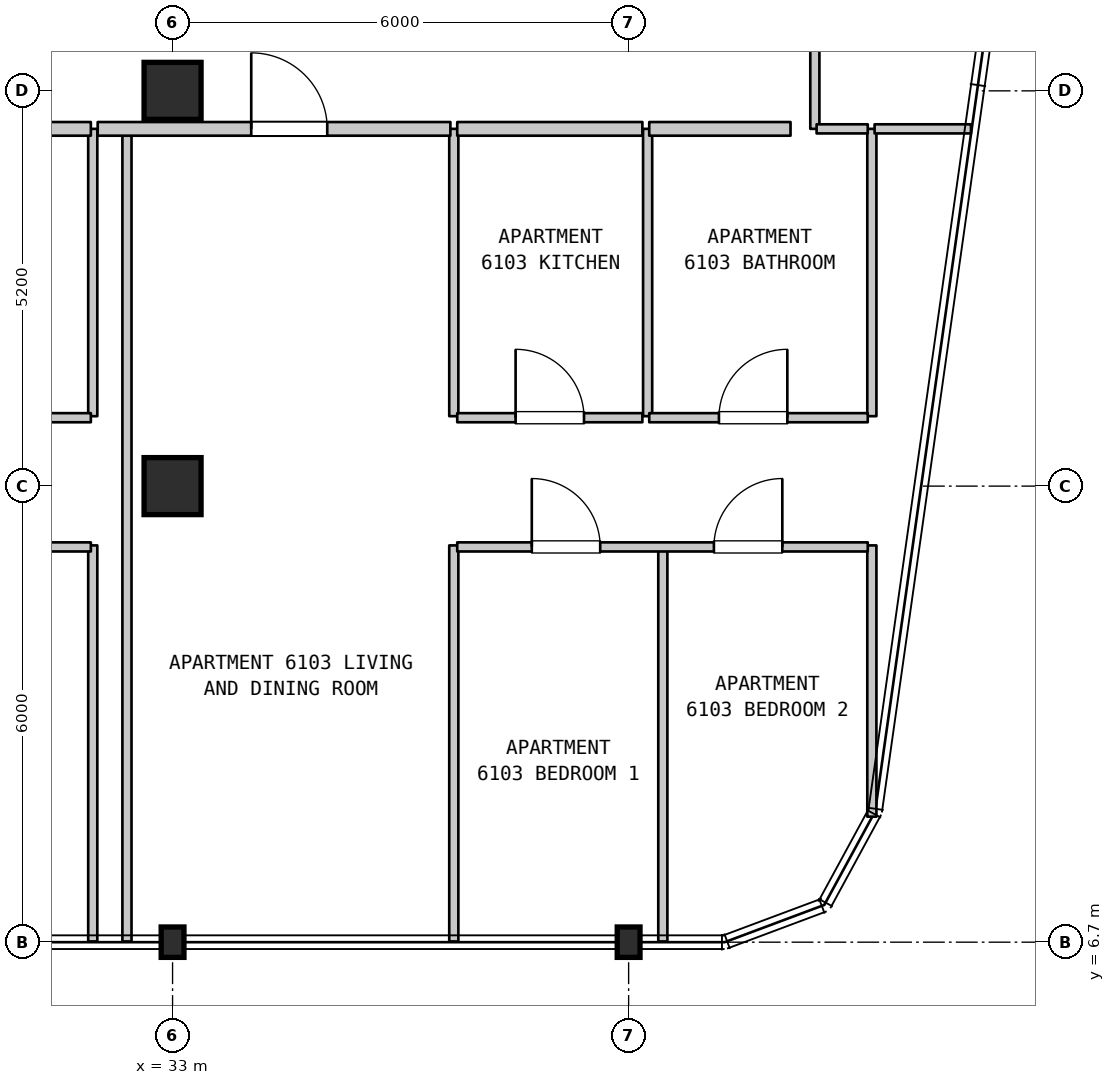
"""IFC4 building model, lengths in metres.
Left out: names, types, materials, properties, quantities, classifications, styles, units other than length and angle.
Written with IfcOpenShell. Run it as: python <this file> out.ifc"""

import sys

from ifc_helpers import new_model, si_unit, direction, frame, frame_2d, origin, origin_2d, place, context, subcontext, project, spatial, rectangle, i_section, extrude, element, fill, save


model = new_model("IFC4")
c1 = context("Model", 3, precision=1e-05, world=origin(), true_north=direction((0.0, 1.0)))
c2 = subcontext(c1, "Body", "Model", "MODEL_VIEW")
j1 = project(units=[si_unit("LENGTHUNIT", "METRE"), si_unit("PLANEANGLEUNIT", "RADIAN")], contexts=[c1])
p1 = place(None, origin())
s1 = spatial("IfcSite", under=j1, at=p1, CompositionType="ELEMENT")
p2 = place(p1, origin())
s2 = spatial("IfcBuilding", under=s1, at=p2, CompositionType="ELEMENT")
p3 = place(p2, frame((0.0, 0.0, 247.3)))
s3 = spatial("IfcBuildingStorey", under=s2, at=p3, CompositionType="ELEMENT", Elevation=247.3)
p4 = place(p3, frame((33.0, 6.7, 0.0), z_axis=(0.0, 0.0, 1.0), x_axis=(1.0, 0.0, 0.0)))
e1 = element("IfcColumn", 1, at=p4, inside=s3, PredefinedType="COLUMN", context=c2, shape_type="SweptSolid", body=[
    extrude(i_section(OverallWidth=0.3, OverallDepth=0.4, WebThickness=0.013, FlangeThickness=0.024, FilletRadius=0.027, at=origin_2d()), origin(), (0.0, 0.0, 1.0), 3.7),
])
for number, where, z_axis, x_axis in (
    (2, (33.0, 12.7, 0.0), (0.0, 0.0, 1.0), (1.0, 0.0, 0.0)),
    (3, (33.0, 17.9, 0.0), (0.0, 0.0, 1.0), (1.0, 0.0, 0.0)),
):
    element("IfcColumn", number, at=place(p3, frame(where, z_axis=z_axis, x_axis=x_axis)), inside=s3, PredefinedType="COLUMN", context=c2, shape_type="SweptSolid", body=[
        extrude(rectangle(XDim=0.75, YDim=0.75, at=origin_2d()), origin(), (0.0, 0.0, 1.0), 3.7),
    ])
p5 = place(p3, frame((39.0, 6.7, 0.0), z_axis=(0.0, 0.0, 1.0), x_axis=(1.0, 0.0, 0.0)))
e4 = element("IfcColumn", 4, at=p5, inside=s3, PredefinedType="COLUMN", context=c2, shape_type="SweptSolid", body=[
    extrude(i_section(OverallWidth=0.3, OverallDepth=0.4, WebThickness=0.013, FlangeThickness=0.024, FilletRadius=0.027, at=origin_2d()), origin(), (0.0, 0.0, 1.0), 3.7),
])
p6 = place(p3, frame((31.95, 6.71, 0.0), z_axis=(0.0, 0.0, 1.0), x_axis=(0.0, 1.0, 0.0)))
e5 = element("IfcWall", 5, at=p6, inside=s3, PredefinedType="PARTITIONING", context=c2, shape_type="SweptSolid", body=[
    extrude(rectangle(XDim=5.21, YDim=0.12, at=frame_2d((2.605, 0.0))), origin(), (0.0, 0.0, 1.0), 3.39),
])
p7 = place(p3, frame((31.95, 13.62, 0.0), z_axis=(0.0, 0.0, 1.0), x_axis=(0.0, 1.0, 0.0)))
e6 = element("IfcWall", 6, at=p7, inside=s3, PredefinedType="PARTITIONING", context=c2, shape_type="SweptSolid", body=[
    extrude(rectangle(XDim=3.78, YDim=0.12, at=frame_2d((1.89, 0.0))), origin(), (0.0, 0.0, 1.0), 3.39),
])
p8 = place(p3, frame((32.4, 6.71, 0.0), z_axis=(0.0, 0.0, 1.0), x_axis=(0.0, 1.0, 0.0)))
e7 = element("IfcWall", 7, at=p8, inside=s3, PredefinedType="PARTITIONING", context=c2, shape_type="SweptSolid", body=[
    extrude(rectangle(XDim=10.69, YDim=0.12, at=frame_2d((5.345, 0.0))), origin(), (0.0, 0.0, 1.0), 3.39),
])
p9 = place(p3, frame((36.7, 6.71, 0.0), z_axis=(0.0, 0.0, 1.0), x_axis=(0.0, 1.0, 0.0)))
e8 = element("IfcWall", 8, at=p9, inside=s3, PredefinedType="PARTITIONING", context=c2, shape_type="SweptSolid", body=[
    extrude(rectangle(XDim=5.21, YDim=0.12, at=frame_2d((2.605, 0.0))), origin(), (0.0, 0.0, 1.0), 3.39),
])
for number, where, z_axis, x_axis in (
    (9, (36.7, 13.62, 0.0), (0.0, 0.0, 1.0), (0.0, 1.0, 0.0)),
    (10, (39.25, 13.62, 0.0), (0.0, 0.0, 1.0), (0.0, 1.0, 0.0)),
):
    element("IfcWall", number, at=place(p3, frame(where, z_axis=z_axis, x_axis=x_axis)), inside=s3, PredefinedType="PARTITIONING", context=c2, shape_type="SweptSolid", body=[
        extrude(rectangle(XDim=3.78, YDim=0.12, at=frame_2d((1.89, 0.0))), origin(), (0.0, 0.0, 1.0), 3.39),
    ])
p10 = place(p3, frame((39.45, 6.71, 0.0), z_axis=(0.0, 0.0, 1.0), x_axis=(0.0, 1.0, 0.0)))
e11 = element("IfcWall", 11, at=p10, inside=s3, PredefinedType="PARTITIONING", context=c2, shape_type="SweptSolid", body=[
    extrude(rectangle(XDim=5.21, YDim=0.12, at=frame_2d((2.605, 0.0))), origin(), (0.0, 0.0, 1.0), 3.39),
])
p11 = place(p3, frame((41.45, 17.4, 0.0), z_axis=(0.0, 0.0, 1.0), x_axis=(0.0, 1.0, 0.0)))
e12 = element("IfcWall", 12, at=p11, inside=s3, PredefinedType="PARTITIONING", context=c2, shape_type="SweptSolid", body=[
    extrude(rectangle(XDim=2.099, YDim=0.12, at=frame_2d((1.05, 0.0))), origin(), (0.0, 0.0, 1.0), 3.39),
])
p12 = place(p3, frame((42.2, 8.351, 0.0), z_axis=(0.0, 0.0, 1.0), x_axis=(0.0, 1.0, 0.0)))
e13 = element("IfcWall", 13, at=p12, inside=s3, PredefinedType="PARTITIONING", context=c2, shape_type="SweptSolid", body=[
    extrude(rectangle(XDim=3.569, YDim=0.12, at=frame_2d((1.784, 0.0))), origin(), (0.0, 0.0, 1.0), 3.39),
])
p13 = place(p3, frame((42.2, 13.62, 0.0), z_axis=(0.0, 0.0, 1.0), x_axis=(0.0, 1.0, 0.0)))
e14 = element("IfcWall", 14, at=p13, inside=s3, PredefinedType="PARTITIONING", context=c2, shape_type="SweptSolid", body=[
    extrude(rectangle(XDim=3.78, YDim=0.12, at=frame_2d((1.89, 0.0))), origin(), (0.0, 0.0, 1.0), 3.39),
])
p14 = place(p3, frame((25.365, 11.9, 0.0), z_axis=(0.0, 0.0, 1.0), x_axis=(1.0, 0.0, 0.0)))
e15 = element("IfcWall", 15, at=p14, inside=s3, PredefinedType="PARTITIONING", context=c2, shape_type="SweptSolid", body=[
    extrude(rectangle(XDim=6.56, YDim=0.12, at=frame_2d((3.28, 0.0))), origin(), (0.0, 0.0, 1.0), 3.39),
])
p15 = place(p14, frame((1.271, 0.0, 0.0)))
e16 = element("IfcOpeningElement", 16, at=p15, cuts=e15, PredefinedType="OPENING", context=c2, shape_type="SweptSolid", body=[
    extrude(rectangle(XDim=0.9, YDim=2.15, at=frame_2d((0.45, 1.075))), frame((0.0, 0.07, 0.0), z_axis=(0.0, -1.0, 0.0), x_axis=(1.0, 0.0, 0.0)), (0.0, 0.0, 1.0), 0.14),
])
p16 = place(p14, frame((4.246, 0.0, 0.0)))
e17 = element("IfcOpeningElement", 17, at=p16, cuts=e15, PredefinedType="OPENING", context=c2, shape_type="SweptSolid", body=[
    extrude(rectangle(XDim=0.9, YDim=2.15, at=frame_2d((0.45, 1.075))), frame((0.0, 0.07, 0.0), z_axis=(0.0, -1.0, 0.0), x_axis=(1.0, 0.0, 0.0)), (0.0, 0.0, 1.0), 0.14),
])
p17 = place(p3, frame((36.745, 11.9, 0.0), z_axis=(0.0, 0.0, 1.0), x_axis=(1.0, 0.0, 0.0)))
e18 = element("IfcWall", 18, at=p17, inside=s3, PredefinedType="PARTITIONING", context=c2, shape_type="SweptSolid", body=[
    extrude(rectangle(XDim=5.401, YDim=0.12, at=frame_2d((2.7, 0.0))), origin(), (0.0, 0.0, 1.0), 3.39),
])
p18 = place(p17, frame((0.981, 0.0, 0.0)))
e19 = element("IfcOpeningElement", 19, at=p18, cuts=e18, PredefinedType="OPENING", context=c2, shape_type="SweptSolid", body=[
    extrude(rectangle(XDim=0.9, YDim=2.15, at=frame_2d((0.45, 1.075))), frame((0.0, 0.07, 0.0), z_axis=(0.0, -1.0, 0.0), x_axis=(1.0, 0.0, 0.0)), (0.0, 0.0, 1.0), 0.14),
])
p19 = place(p17, frame((3.377, 0.0, 0.0)))
e20 = element("IfcOpeningElement", 20, at=p19, cuts=e18, PredefinedType="OPENING", context=c2, shape_type="SweptSolid", body=[
    extrude(rectangle(XDim=0.9, YDim=2.15, at=frame_2d((0.45, 1.075))), frame((0.0, 0.07, 0.0), z_axis=(0.0, -1.0, 0.0), x_axis=(1.0, 0.0, 0.0)), (0.0, 0.0, 1.0), 0.14),
])
p20 = place(p3, frame((28.424, 13.6, 0.0), z_axis=(0.0, 0.0, 1.0), x_axis=(1.0, 0.0, 0.0)))
e21 = element("IfcWall", 21, at=p20, inside=s3, PredefinedType="PARTITIONING", context=c2, shape_type="SweptSolid", body=[
    extrude(rectangle(XDim=3.501, YDim=0.12, at=frame_2d((1.75, 0.0))), origin(), (0.0, 0.0, 1.0), 3.39),
])
p21 = place(p20, frame((1.228, 0.0, 0.0)))
e22 = element("IfcOpeningElement", 22, at=p21, cuts=e21, PredefinedType="OPENING", context=c2, shape_type="SweptSolid", body=[
    extrude(rectangle(XDim=0.9, YDim=2.1, at=frame_2d((0.45, 1.05))), frame((0.0, 0.07, 0.0), z_axis=(0.0, -1.0, 0.0), x_axis=(1.0, 0.0, 0.0)), (0.0, 0.0, 1.0), 0.14),
])
p22 = place(p3, frame((36.745, 13.6, 0.0), z_axis=(0.0, 0.0, 1.0), x_axis=(1.0, 0.0, 0.0)))
e23 = element("IfcWall", 23, at=p22, inside=s3, PredefinedType="PARTITIONING", context=c2, shape_type="SweptSolid", body=[
    extrude(rectangle(XDim=2.436, YDim=0.12, at=frame_2d((1.218, 0.0))), origin(), (0.0, 0.0, 1.0), 3.39),
])
p23 = place(p22, frame((0.768, 0.0, 0.0)))
e24 = element("IfcOpeningElement", 24, at=p23, cuts=e23, PredefinedType="OPENING", context=c2, shape_type="SweptSolid", body=[
    extrude(rectangle(XDim=0.9, YDim=2.15, at=frame_2d((0.45, 1.075))), frame((0.0, 0.07, 0.0), z_axis=(0.0, -1.0, 0.0), x_axis=(1.0, 0.0, 0.0)), (0.0, 0.0, 1.0), 0.14),
])
p24 = place(p3, frame((39.271, 13.6, 0.0), z_axis=(0.0, 0.0, 1.0), x_axis=(1.0, 0.0, 0.0)))
e25 = element("IfcWall", 25, at=p24, inside=s3, PredefinedType="PARTITIONING", context=c2, shape_type="SweptSolid", body=[
    extrude(rectangle(XDim=2.875, YDim=0.12, at=frame_2d((1.438, 0.0))), origin(), (0.0, 0.0, 1.0), 3.39),
])
p25 = place(p24, frame((0.917, 0.0, 0.0)))
e26 = element("IfcOpeningElement", 26, at=p25, cuts=e25, PredefinedType="OPENING", context=c2, shape_type="SweptSolid", body=[
    extrude(rectangle(XDim=0.9, YDim=2.1, at=frame_2d((0.45, 1.05))), frame((0.0, 0.07, 0.0), z_axis=(0.0, -1.0, 0.0), x_axis=(1.0, 0.0, 0.0)), (0.0, 0.0, 1.0), 0.14),
])
p26 = place(p3, frame((28.424, 17.4, 0.0), z_axis=(0.0, 0.0, 1.0), x_axis=(1.0, 0.0, 0.0)))
e27 = element("IfcWall", 27, at=p26, inside=s3, PredefinedType="STANDARD", context=c2, shape_type="SweptSolid", body=[
    extrude(rectangle(XDim=3.501, YDim=0.18, at=frame_2d((1.75, 0.0))), origin(), (0.0, 0.0, 1.0), 3.39),
])
p27 = place(p3, frame((32.015, 17.4, 0.0), z_axis=(0.0, 0.0, 1.0), x_axis=(1.0, 0.0, 0.0)))
e28 = element("IfcWall", 28, at=p27, inside=s3, PredefinedType="STANDARD", context=c2, shape_type="SweptSolid", body=[
    extrude(rectangle(XDim=4.64, YDim=0.18, at=frame_2d((2.32, 0.0))), origin(), (0.0, 0.0, 1.0), 3.39),
])
p28 = place(p27, frame((2.02, 0.0, 0.0)))
e29 = element("IfcOpeningElement", 29, at=p28, cuts=e28, PredefinedType="OPENING", context=c2, shape_type="SweptSolid", body=[
    extrude(rectangle(XDim=1.0, YDim=2.15, at=frame_2d((0.5, 1.075))), frame((0.0, 0.1, 0.0), z_axis=(0.0, -1.0, 0.0), x_axis=(1.0, 0.0, 0.0)), (0.0, 0.0, 1.0), 0.2),
])
p29 = place(p3, frame((36.745, 17.4, 0.0), z_axis=(0.0, 0.0, 1.0), x_axis=(1.0, 0.0, 0.0)))
e30 = element("IfcWall", 30, at=p29, inside=s3, PredefinedType="STANDARD", context=c2, shape_type="SweptSolid", body=[
    extrude(rectangle(XDim=2.436, YDim=0.18, at=frame_2d((1.218, 0.0))), origin(), (0.0, 0.0, 1.0), 3.39),
])
p30 = place(p3, frame((39.271, 17.4, 0.0), z_axis=(0.0, 0.0, 1.0), x_axis=(1.0, 0.0, 0.0)))
e31 = element("IfcWall", 31, at=p30, inside=s3, PredefinedType="STANDARD", context=c2, shape_type="SweptSolid", body=[
    extrude(rectangle(XDim=1.859, YDim=0.18, at=frame_2d((0.929, 0.0))), origin(), (0.0, 0.0, 1.0), 3.39),
])
p31 = place(p3, frame((41.473, 17.4, 0.0), z_axis=(0.0, 0.0, 1.0), x_axis=(1.0, 0.0, 0.0)))
e32 = element("IfcWall", 32, at=p31, inside=s3, PredefinedType="PARTITIONING", context=c2, shape_type="SweptSolid", body=[
    extrude(rectangle(XDim=0.673, YDim=0.12, at=frame_2d((0.336, 0.0))), origin(), (0.0, 0.0, 1.0), 3.39),
])
p32 = place(p3, frame((42.236, 17.4, 0.0), z_axis=(0.0, 0.0, 1.0), x_axis=(1.0, 0.0, 0.0)))
e33 = element("IfcWall", 33, at=p32, inside=s3, PredefinedType="PARTITIONING", context=c2, shape_type="SweptSolid", body=[
    extrude(rectangle(XDim=1.268, YDim=0.12, at=frame_2d((0.634, 0.0))), origin(), (0.0, 0.0, 1.0), 3.39),
])
p33 = place(p18, origin())
e34 = element("IfcDoor", 34, at=p33, inside=s3, OperationType="SINGLE_SWING_LEFT", PredefinedType="DOOR", context=c2, shape_type="SweptSolid", body=[
    extrude(rectangle(XDim=0.9, YDim=2.15, at=frame_2d((0.45, 1.075))), frame((0.0, 0.025, 0.0), z_axis=(0.0, -1.0, 0.0), x_axis=(1.0, 0.0, 0.0)), (0.0, 0.0, 1.0), 0.05),
])
fill(e19, e34)
p34 = place(p19, origin())
e35 = element("IfcDoor", 35, at=p34, inside=s3, OperationType="SINGLE_SWING_RIGHT", PredefinedType="DOOR", context=c2, shape_type="SweptSolid", body=[
    extrude(rectangle(XDim=0.9, YDim=2.15, at=frame_2d((0.45, 1.075))), frame((0.0, 0.025, 0.0), z_axis=(0.0, -1.0, 0.0), x_axis=(1.0, 0.0, 0.0)), (0.0, 0.0, 1.0), 0.05),
])
fill(e20, e35)
p35 = place(p23, origin())
e36 = element("IfcDoor", 36, at=p35, inside=s3, OperationType="SINGLE_SWING_LEFT", PredefinedType="DOOR", context=c2, shape_type="SweptSolid", body=[
    extrude(rectangle(XDim=0.9, YDim=2.15, at=frame_2d((0.45, 1.075))), frame((0.0, 0.025, 0.0), z_axis=(0.0, -1.0, 0.0), x_axis=(1.0, 0.0, 0.0)), (0.0, 0.0, 1.0), 0.05),
])
fill(e24, e36)
p36 = place(p25, origin())
e37 = element("IfcDoor", 37, at=p36, inside=s3, OperationType="SINGLE_SWING_RIGHT", PredefinedType="DOOR", context=c2, shape_type="SweptSolid", body=[
    extrude(rectangle(XDim=0.9, YDim=2.1, at=frame_2d((0.45, 1.05))), frame((0.0, 0.025, 0.0), z_axis=(0.0, -1.0, 0.0), x_axis=(1.0, 0.0, 0.0)), (0.0, 0.0, 1.0), 0.05),
])
fill(e26, e37)
p37 = place(p28, origin())
e38 = element("IfcDoor", 38, at=p37, inside=s3, OperationType="SINGLE_SWING_LEFT", PredefinedType="DOOR", context=c2, shape_type="SweptSolid", body=[
    extrude(rectangle(XDim=1.0, YDim=2.15, at=frame_2d((0.5, 1.075))), frame((0.0, 0.025, 0.0), z_axis=(0.0, -1.0, 0.0), x_axis=(1.0, 0.0, 0.0)), (0.0, 0.0, 1.0), 0.05),
])
fill(e29, e38)
save(model, sys.argv[1])
